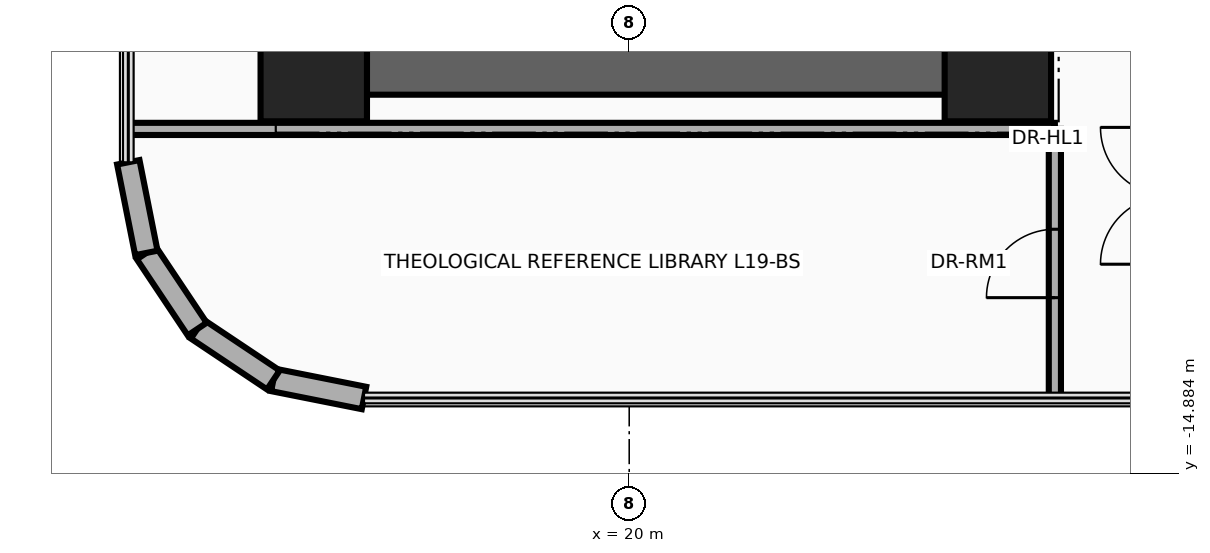
"""IFC4 building model, lengths in metres.
Left out: names, types, materials, properties, quantities, classifications, styles, units other than length and angle.
Written with IfcOpenShell. Run it as: python <this file> out.ifc"""

import sys

from ifc_helpers import new_model, si_unit, direction, frame, frame_2d, origin, origin_2d, place, context, subcontext, project, spatial, rectangle, extrude, source, transform, mapped, element, fill, save


model = new_model("IFC4")
c1 = context("Model", 3, precision=1e-05, world=origin(), true_north=direction((0.0, 1.0)))
c2 = subcontext(c1, "Body", "Model", "MODEL_VIEW")
j1 = project(units=[si_unit("LENGTHUNIT", "METRE"), si_unit("PLANEANGLEUNIT", "RADIAN")], contexts=[c1])
p1 = place(None, origin())
s1 = spatial("IfcSite", under=j1, at=p1, CompositionType="ELEMENT")
p2 = place(p1, origin())
s2 = spatial("IfcBuilding", under=s1, at=p2, CompositionType="ELEMENT")
p3 = place(p2, frame((0.0, 0.0, 77.8)))
s3 = spatial("IfcBuildingStorey", under=s2, at=p3, CompositionType="ELEMENT", Elevation=77.8)
p4 = place(p3, frame((24.85, -9.9, 0.0), z_axis=(0.0, 0.0, 1.0), x_axis=(0.0, 1.0, 0.0)))
e1 = element("IfcWall", 1, at=p4, inside=s3, PredefinedType="SHEAR", context=c2, shape_type="SweptSolid", body=[
    extrude(rectangle(XDim=8.95, YDim=0.7, at=frame_2d((4.475, 0.0))), origin(), (0.0, 0.0, 1.0), 3.46),
])
p5 = place(p3, frame((15.85, -9.55, 0.0), z_axis=(0.0, 0.0, 1.0), x_axis=(1.0, 0.0, 0.0)))
e2 = element("IfcWall", 2, at=p5, inside=s3, PredefinedType="SHEAR", context=c2, shape_type="SweptSolid", body=[
    extrude(rectangle(XDim=9.0, YDim=0.7, at=frame_2d((4.5, 0.0))), origin(), (0.0, 0.0, 1.0), 3.46),
])
m1 = source(origin(), c2, "Body", "SweptSolid", [
    extrude(rectangle(XDim=1.4, YDim=1.4, at=origin_2d()), origin(), (0.0, 0.0, 1.0), 3.7),
])
for number, where, z_axis, x_axis in (
    (3, (15.85, -9.55, 0.0), (0.0, 0.0, 1.0), (1.0, 0.0, 0.0)),
    (4, (24.85, -9.55, 0.0), (0.0, 0.0, 1.0), (1.0, 0.0, 0.0)),
):
    element("IfcColumn", number, at=place(p3, frame(where, z_axis=z_axis, x_axis=x_axis)), inside=s3, PredefinedType="COLUMN", context=c2, shape_type="MappedRepresentation", body=[
        mapped(m1, transform((0.0, 0.0, 0.0), x_axis=(1.0, 0.0, 0.0), y_axis=(0.0, 1.0, 0.0), z_axis=(0.0, 0.0, 1.0), scale=1.0)),
    ])
p6 = place(p3, frame((16.511, -13.89, 0.0), z_axis=(0.0, 0.0, 1.0), x_axis=(-0.980804027463, 0.194996050505, 0.0)))
e5 = element("IfcWall", 5, at=p6, inside=s3, PredefinedType="SOLIDWALL", context=c2, shape_type="SweptSolid", body=[
    extrude(rectangle(XDim=1.216, YDim=0.3, at=frame_2d((0.608, 0.0))), origin(), (0.0, 0.0, 1.0), 3.46),
])
for number, where, z_axis, x_axis in (
    (6, (15.318, -13.653, 0.0), (0.0, 0.0, 1.0), (-0.831, 0.556, 0.0)),
    (7, (14.317, -12.983, 0.0), (0.0, 0.0, 1.0), (-0.556, 0.831, 0.0)),
):
    element("IfcWall", number, at=place(p3, frame(where, z_axis=z_axis, x_axis=x_axis)), inside=s3, PredefinedType="SOLIDWALL", context=c2, shape_type="SweptSolid", body=[
        extrude(rectangle(XDim=1.205, YDim=0.3, at=frame_2d((0.603, 0.0))), origin(), (0.0, 0.0, 1.0), 3.46),
    ])
p7 = place(p3, frame((13.647, -11.982, 0.0), z_axis=(0.0, 0.0, 1.0), x_axis=(-0.195189223115, 0.980765602568, 0.0)))
e8 = element("IfcWall", 8, at=p7, inside=s3, PredefinedType="SOLIDWALL", context=c2, shape_type="SweptSolid", body=[
    extrude(rectangle(XDim=1.216, YDim=0.3, at=frame_2d((0.608, 0.0))), origin(), (0.0, 0.0, 1.0), 3.46),
])
p8 = place(p3, frame((25.6, -13.89, 0.0), z_axis=(0.0, 0.0, 1.0), x_axis=(0.0, 1.0, 0.0)))
e9 = element("IfcWall", 9, at=p8, inside=s3, PredefinedType="PARTITIONING", context=c2, shape_type="SweptSolid", body=[
    extrude(rectangle(XDim=3.54, YDim=0.16, at=frame_2d((1.77, 0.0))), origin(), (0.0, 0.0, 1.0), 3.46),
])
p9 = place(p8, frame((1.32, 0.0, 0.0)))
e10 = element("IfcOpeningElement", 10, at=p9, cuts=e9, PredefinedType="OPENING", context=c2, shape_type="SweptSolid", body=[
    extrude(rectangle(XDim=0.9, YDim=2.1, at=frame_2d((0.45, 1.05))), frame((0.0, 0.095, 0.0), z_axis=(0.0, -1.0, 0.0), x_axis=(1.0, 0.0, 0.0)), (0.0, 0.0, 1.0), 0.19),
])
p10 = place(p3, frame((13.41, -10.35, 0.0), z_axis=(0.0, 0.0, 1.0), x_axis=(1.0, 0.0, 0.0)))
e11 = element("IfcWall", 11, at=p10, inside=s3, PredefinedType="PARTITIONING", context=c2, shape_type="SweptSolid", body=[
    extrude(rectangle(XDim=12.19, YDim=0.16, at=frame_2d((6.095, 0.0))), origin(), (0.0, 0.0, 1.0), 3.46),
])
p11 = place(p9, origin())
e12 = element("IfcDoor", 12, at=p11, inside=s3, OperationType="SINGLE_SWING_RIGHT", PredefinedType="DOOR", context=c2, shape_type="SweptSolid", body=[
    extrude(rectangle(XDim=0.9, YDim=2.1, at=frame_2d((0.45, 1.05))), frame((0.0, 0.025, 0.0), z_axis=(0.0, -1.0, 0.0), x_axis=(1.0, 0.0, 0.0)), (0.0, 0.0, 1.0), 0.05),
])
fill(e10, e12)
save(model, sys.argv[1])
